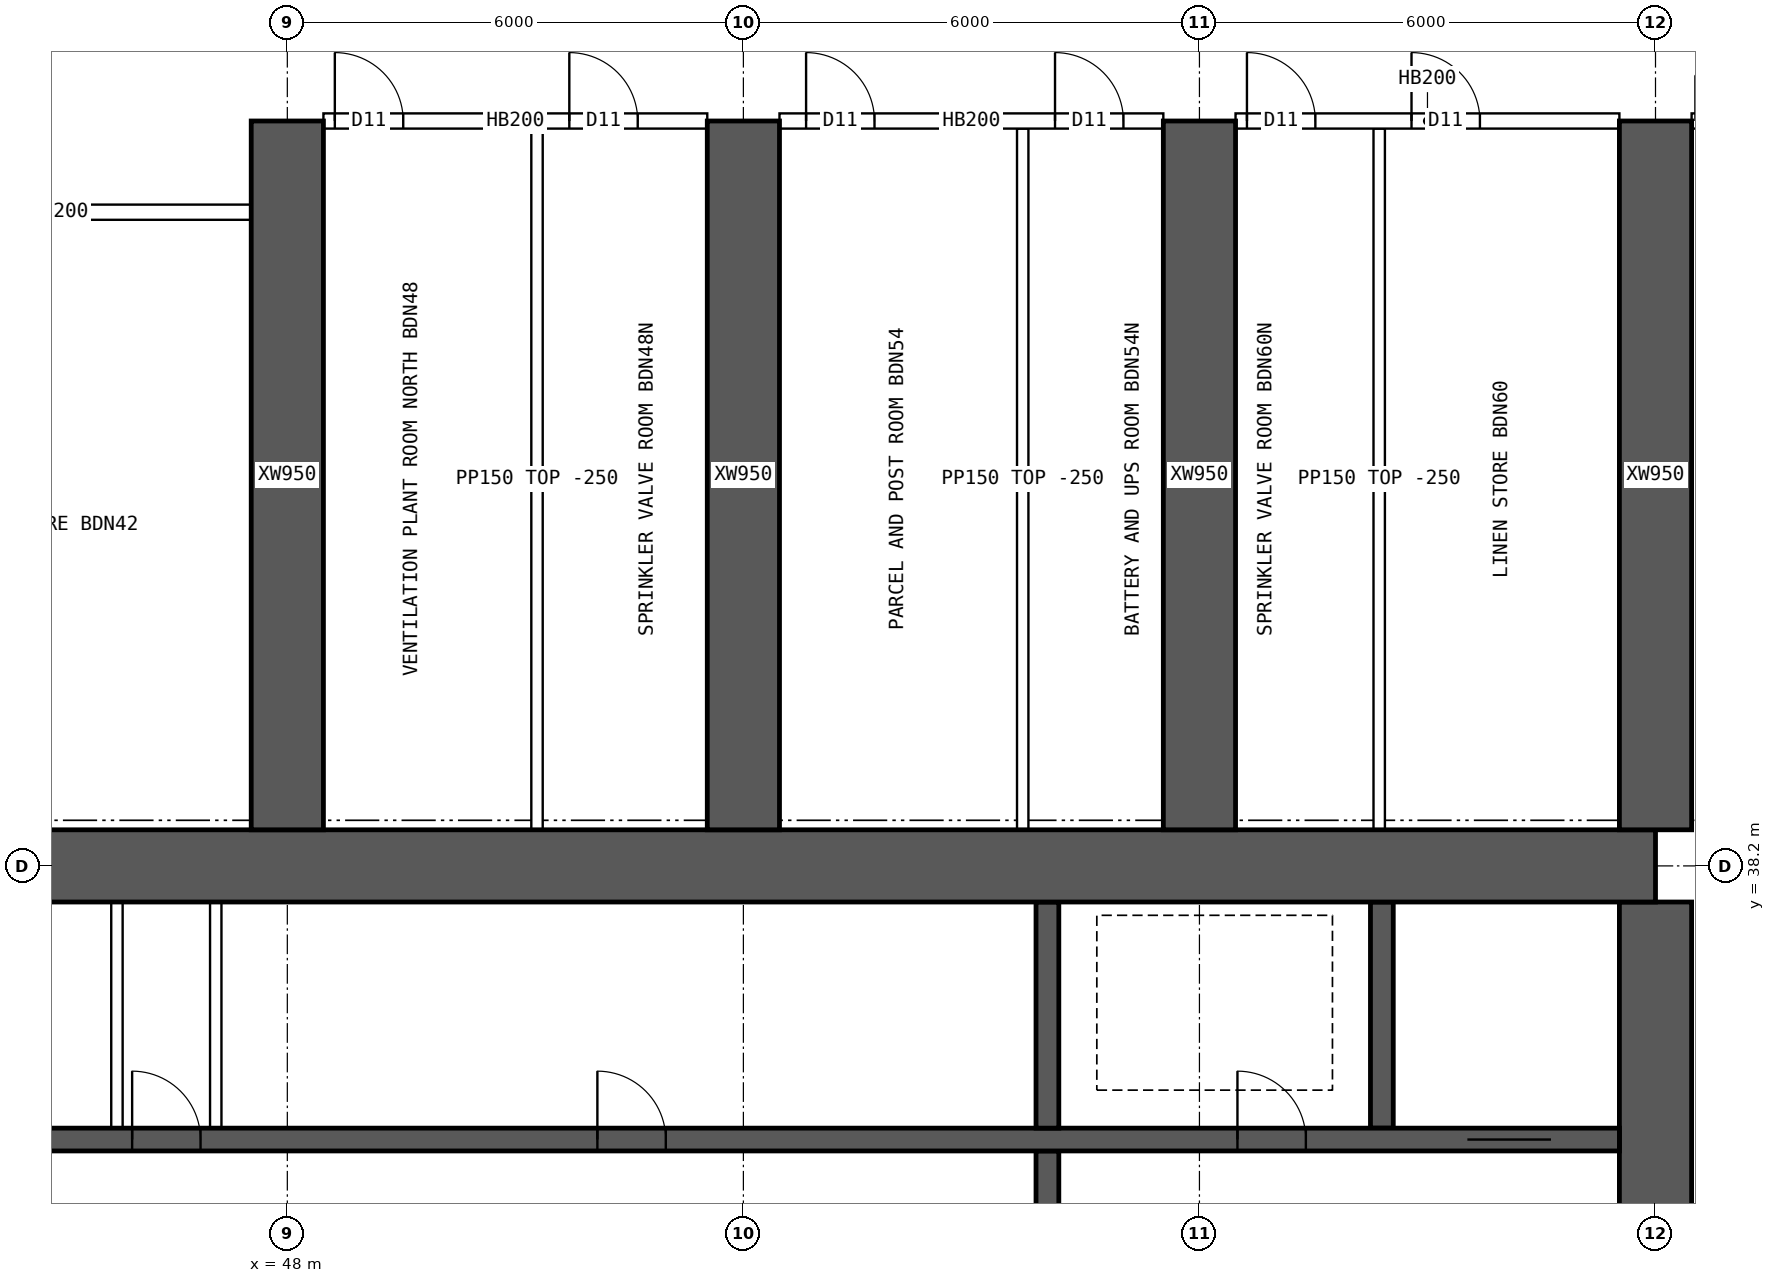
"""IFC4 building model, lengths in metres.
Left out: names, types, materials, properties, quantities, classifications, styles, units other than length and angle.
Written with IfcOpenShell. Run it as: python <this file> out.ifc"""

import sys

from ifc_helpers import new_model, si_unit, direction, frame, frame_2d, origin, place, context, subcontext, project, spatial, rectangle, extrude, element, fill, save


model = new_model("IFC4")
c1 = context("Model", 3, precision=1e-05, world=origin(), true_north=direction((0.0, 1.0)))
c2 = subcontext(c1, "Body", "Model", "MODEL_VIEW")
j1 = project(units=[si_unit("LENGTHUNIT", "METRE"), si_unit("PLANEANGLEUNIT", "RADIAN")], contexts=[c1])
p1 = place(None, origin())
s1 = spatial("IfcSite", under=j1, at=p1, CompositionType="ELEMENT")
p2 = place(p1, origin())
s2 = spatial("IfcBuilding", under=s1, at=p2, CompositionType="ELEMENT")
p3 = place(p2, frame((0.0, 0.0, 88.15)))
s3 = spatial("IfcBuildingStorey", under=s2, at=p3, CompositionType="ELEMENT", Elevation=88.15)
p4 = place(p3, frame((18.0, 38.2, 0.0), z_axis=(0.0, 0.0, 1.0), x_axis=(1.0, 0.0, 0.0)))
e1 = element("IfcWall", 1, at=p4, inside=s3, PredefinedType="SHEAR", context=c2, shape_type="SweptSolid", body=[
    extrude(rectangle(XDim=48.0, YDim=0.95, at=frame_2d((24.0, 0.0))), origin(), (0.0, 0.0, 1.0), 3.75),
])
p5 = place(p3, frame((66.0, 26.275, 0.0), z_axis=(0.0, 0.0, 1.0), x_axis=(0.0, 1.0, 0.0)))
e2 = element("IfcWall", 2, at=p5, inside=s3, PredefinedType="SHEAR", context=c2, shape_type="SweptSolid", body=[
    extrude(rectangle(XDim=11.45, YDim=0.95, at=frame_2d((5.725, 0.0))), origin(), (0.0, 0.0, 1.0), 3.75),
])
p6 = place(p5, frame((5.025, 0.0, 0.0)))
e3 = element("IfcOpeningElement", 3, at=p6, cuts=e2, PredefinedType="OPENING", context=c2, shape_type="SweptSolid", body=[
    extrude(rectangle(XDim=1.2, YDim=2.1, at=frame_2d((0.6, 1.05))), frame((0.0, 0.485, 0.0), z_axis=(0.0, -1.0, 0.0), x_axis=(1.0, 0.0, 0.0)), (0.0, 0.0, 1.0), 0.97),
])
p7 = place(p3, frame((18.475, 34.6, 0.0), z_axis=(0.0, 0.0, 1.0), x_axis=(1.0, 0.0, 0.0)))
e4 = element("IfcWall", 4, at=p7, inside=s3, PredefinedType="SHEAR", context=c2, shape_type="SweptSolid", body=[
    extrude(rectangle(XDim=47.05, YDim=0.3, at=frame_2d((23.525, 0.0))), origin(), (0.0, 0.0, 1.0), 3.75),
])
p8 = place(p7, frame((0.9, 0.0, 0.0)))
e5 = element("IfcOpeningElement", 5, at=p8, cuts=e4, PredefinedType="OPENING", context=c2, shape_type="SweptSolid", body=[
    extrude(rectangle(XDim=1.1, YDim=2.1, at=frame_2d((0.55, 1.05))), frame((0.0, 0.16, 0.0), z_axis=(0.0, -1.0, 0.0), x_axis=(1.0, 0.0, 0.0)), (0.0, 0.0, 1.0), 0.32),
])
p9 = place(p7, frame((45.05, 0.0, 0.0)))
e6 = element("IfcOpeningElement", 6, at=p9, cuts=e4, PredefinedType="OPENING", context=c2, shape_type="SweptSolid", body=[
    extrude(rectangle(XDim=1.1, YDim=2.1, at=frame_2d((0.55, 1.05))), frame((0.0, 0.16, 0.0), z_axis=(0.0, -1.0, 0.0), x_axis=(1.0, 0.0, 0.0)), (0.0, 0.0, 1.0), 0.32),
])
p10 = place(p7, frame((4.125, 0.0, 0.0)))
e7 = element("IfcOpeningElement", 7, at=p10, cuts=e4, PredefinedType="OPENING", context=c2, shape_type="SweptSolid", body=[
    extrude(rectangle(XDim=0.9, YDim=2.1, at=frame_2d((0.45, 1.05))), frame((0.0, 0.16, 0.0), z_axis=(0.0, -1.0, 0.0), x_axis=(1.0, 0.0, 0.0)), (0.0, 0.0, 1.0), 0.32),
])
p11 = place(p7, frame((42.025, 0.0, 0.0)))
e8 = element("IfcOpeningElement", 8, at=p11, cuts=e4, PredefinedType="OPENING", context=c2, shape_type="SweptSolid", body=[
    extrude(rectangle(XDim=0.9, YDim=2.1, at=frame_2d((0.45, 1.05))), frame((0.0, 0.16, 0.0), z_axis=(0.0, -1.0, 0.0), x_axis=(1.0, 0.0, 0.0)), (0.0, 0.0, 1.0), 0.32),
])
p12 = place(p7, frame((8.9, 0.0, 0.0)))
e9 = element("IfcOpeningElement", 9, at=p12, cuts=e4, PredefinedType="OPENING", context=c2, shape_type="SweptSolid", body=[
    extrude(rectangle(XDim=0.9, YDim=2.1, at=frame_2d((0.45, 1.05))), frame((0.0, 0.16, 0.0), z_axis=(0.0, -1.0, 0.0), x_axis=(1.0, 0.0, 0.0)), (0.0, 0.0, 1.0), 0.32),
])
p13 = place(p7, frame((12.874, 0.0, 0.0)))
e10 = element("IfcOpeningElement", 10, at=p13, cuts=e4, PredefinedType="OPENING", context=c2, shape_type="SweptSolid", body=[
    extrude(rectangle(XDim=0.9, YDim=2.1, at=frame_2d((0.45, 1.05))), frame((0.0, 0.16, 0.0), z_axis=(0.0, -1.0, 0.0), x_axis=(1.0, 0.0, 0.0)), (0.0, 0.0, 1.0), 0.32),
])
p14 = place(p7, frame((16.521, 0.0, 0.0)))
e11 = element("IfcOpeningElement", 11, at=p14, cuts=e4, PredefinedType="OPENING", context=c2, shape_type="SweptSolid", body=[
    extrude(rectangle(XDim=0.9, YDim=2.1, at=frame_2d((0.45, 1.05))), frame((0.0, 0.16, 0.0), z_axis=(0.0, -1.0, 0.0), x_axis=(1.0, 0.0, 0.0)), (0.0, 0.0, 1.0), 0.32),
])
p15 = place(p7, frame((20.28, 0.0, 0.0)))
e12 = element("IfcOpeningElement", 12, at=p15, cuts=e4, PredefinedType="OPENING", context=c2, shape_type="SweptSolid", body=[
    extrude(rectangle(XDim=0.9, YDim=2.1, at=frame_2d((0.45, 1.05))), frame((0.0, 0.16, 0.0), z_axis=(0.0, -1.0, 0.0), x_axis=(1.0, 0.0, 0.0)), (0.0, 0.0, 1.0), 0.32),
])
p16 = place(p7, frame((24.686, 0.0, 0.0)))
e13 = element("IfcOpeningElement", 13, at=p16, cuts=e4, PredefinedType="OPENING", context=c2, shape_type="SweptSolid", body=[
    extrude(rectangle(XDim=0.9, YDim=2.1, at=frame_2d((0.45, 1.05))), frame((0.0, 0.16, 0.0), z_axis=(0.0, -1.0, 0.0), x_axis=(1.0, 0.0, 0.0)), (0.0, 0.0, 1.0), 0.32),
])
p17 = place(p7, frame((27.483, 0.0, 0.0)))
e14 = element("IfcOpeningElement", 14, at=p17, cuts=e4, PredefinedType="OPENING", context=c2, shape_type="SweptSolid", body=[
    extrude(rectangle(XDim=0.9, YDim=2.1, at=frame_2d((0.45, 1.05))), frame((0.0, 0.16, 0.0), z_axis=(0.0, -1.0, 0.0), x_axis=(1.0, 0.0, 0.0)), (0.0, 0.0, 1.0), 0.32),
])
p18 = place(p7, frame((33.604, 0.0, 0.0)))
e15 = element("IfcOpeningElement", 15, at=p18, cuts=e4, PredefinedType="OPENING", context=c2, shape_type="SweptSolid", body=[
    extrude(rectangle(XDim=0.9, YDim=2.1, at=frame_2d((0.45, 1.05))), frame((0.0, 0.16, 0.0), z_axis=(0.0, -1.0, 0.0), x_axis=(1.0, 0.0, 0.0)), (0.0, 0.0, 1.0), 0.32),
])
p19 = place(p3, frame((58.0, 30.55, 0.0), z_axis=(0.0, 0.0, 1.0), x_axis=(0.0, 1.0, 0.0)))
e16 = element("IfcWall", 16, at=p19, inside=s3, PredefinedType="SHEAR", context=c2, shape_type="SweptSolid", body=[
    extrude(rectangle(XDim=3.9, YDim=0.3, at=frame_2d((1.95, 0.0))), origin(), (0.0, 0.0, 1.0), 3.75),
])
p20 = place(p19, frame((1.4, 0.0, 0.0)))
e17 = element("IfcOpeningElement", 17, at=p20, cuts=e16, PredefinedType="OPENING", context=c2, shape_type="SweptSolid", body=[
    extrude(rectangle(XDim=1.2, YDim=2.1, at=frame_2d((0.6, 1.05))), frame((0.0, 0.16, 0.0), z_axis=(0.0, -1.0, 0.0), x_axis=(1.0, 0.0, 0.0)), (0.0, 0.0, 1.0), 0.32),
])
for number, where, z_axis, x_axis in (
    (18, (62.4, 34.75, 0.0), (0.0, 0.0, 1.0), (0.0, 1.0, 0.0)),
    (19, (58.0, 34.75, 0.0), (0.0, 0.0, 1.0), (0.0, 1.0, 0.0)),
):
    element("IfcWall", number, at=place(p3, frame(where, z_axis=z_axis, x_axis=x_axis)), inside=s3, PredefinedType="SHEAR", context=c2, shape_type="SweptSolid", body=[
        extrude(rectangle(XDim=2.975, YDim=0.3, at=frame_2d((1.488, 0.0))), origin(), (0.0, 0.0, 1.0), 3.75),
    ])
for number, where, z_axis, x_axis in (
    (20, (48.0, 38.675, 0.0), (0.0, 0.0, 1.0), (0.0, 1.0, 0.0)),
    (21, (54.0, 38.675, 0.0), (0.0, 0.0, 1.0), (0.0, 1.0, 0.0)),
    (22, (60.0, 38.675, 0.0), (0.0, 0.0, 1.0), (0.0, 1.0, 0.0)),
    (23, (66.0, 38.675, 0.0), (0.0, 0.0, 1.0), (0.0, 1.0, 0.0)),
):
    element("IfcWall", number, at=place(p3, frame(where, z_axis=z_axis, x_axis=x_axis)), inside=s3, PredefinedType="SHEAR", context=c2, shape_type="SweptSolid", body=[
        extrude(rectangle(XDim=9.325, YDim=0.95, at=frame_2d((4.663, 0.0))), origin(), (0.0, 0.0, 1.0), 3.75),
    ])
for number, where, z_axis, x_axis in (
    (24, (45.758, 34.75, 0.0), (0.0, 0.0, 1.0), (0.0, 1.0, 0.0)),
    (25, (47.058, 34.75, 0.0), (0.0, 0.0, 1.0), (0.0, 1.0, 0.0)),
):
    element("IfcWall", number, at=place(p3, frame(where, z_axis=z_axis, x_axis=x_axis)), inside=s3, PredefinedType="SOLIDWALL", context=c2, shape_type="SweptSolid", body=[
        extrude(rectangle(XDim=2.975, YDim=0.15, at=frame_2d((1.488, 0.0))), origin(), (0.0, 0.0, 1.0), 3.5),
    ])
p21 = place(p3, frame((48.475, 48.0, 0.0), z_axis=(0.0, 0.0, 1.0), x_axis=(1.0, 0.0, 0.0)))
e26 = element("IfcWall", 26, at=p21, inside=s3, PredefinedType="SOLIDWALL", context=c2, shape_type="SweptSolid", body=[
    extrude(rectangle(XDim=5.05, YDim=0.2, at=frame_2d((2.525, 0.0))), origin(), (0.0, 0.0, 1.0), 3.5),
])
p22 = place(p21, frame((0.15, 0.0, 0.0)))
e27 = element("IfcOpeningElement", 27, at=p22, cuts=e26, PredefinedType="OPENING", context=c2, shape_type="SweptSolid", body=[
    extrude(rectangle(XDim=0.9, YDim=2.1, at=frame_2d((0.45, 1.05))), frame((0.0, 0.11, 0.0), z_axis=(0.0, -1.0, 0.0), x_axis=(1.0, 0.0, 0.0)), (0.0, 0.0, 1.0), 0.22),
])
p23 = place(p21, frame((3.235, 0.0, 0.0)))
e28 = element("IfcOpeningElement", 28, at=p23, cuts=e26, PredefinedType="OPENING", context=c2, shape_type="SweptSolid", body=[
    extrude(rectangle(XDim=0.9, YDim=2.1, at=frame_2d((0.45, 1.05))), frame((0.0, 0.11, 0.0), z_axis=(0.0, -1.0, 0.0), x_axis=(1.0, 0.0, 0.0)), (0.0, 0.0, 1.0), 0.22),
])
p24 = place(p3, frame((54.475, 48.0, 0.0), z_axis=(0.0, 0.0, 1.0), x_axis=(1.0, 0.0, 0.0)))
e29 = element("IfcWall", 29, at=p24, inside=s3, PredefinedType="SOLIDWALL", context=c2, shape_type="SweptSolid", body=[
    extrude(rectangle(XDim=5.05, YDim=0.2, at=frame_2d((2.525, 0.0))), origin(), (0.0, 0.0, 1.0), 3.5),
])
p25 = place(p24, frame((0.35, 0.0, 0.0)))
e30 = element("IfcOpeningElement", 30, at=p25, cuts=e29, PredefinedType="OPENING", context=c2, shape_type="SweptSolid", body=[
    extrude(rectangle(XDim=0.9, YDim=2.1, at=frame_2d((0.45, 1.05))), frame((0.0, 0.11, 0.0), z_axis=(0.0, -1.0, 0.0), x_axis=(1.0, 0.0, 0.0)), (0.0, 0.0, 1.0), 0.22),
])
p26 = place(p24, frame((3.625, 0.0, 0.0)))
e31 = element("IfcOpeningElement", 31, at=p26, cuts=e29, PredefinedType="OPENING", context=c2, shape_type="SweptSolid", body=[
    extrude(rectangle(XDim=0.9, YDim=2.1, at=frame_2d((0.45, 1.05))), frame((0.0, 0.11, 0.0), z_axis=(0.0, -1.0, 0.0), x_axis=(1.0, 0.0, 0.0)), (0.0, 0.0, 1.0), 0.22),
])
p27 = place(p3, frame((60.475, 48.0, 0.0), z_axis=(0.0, 0.0, 1.0), x_axis=(1.0, 0.0, 0.0)))
e32 = element("IfcWall", 32, at=p27, inside=s3, PredefinedType="SOLIDWALL", context=c2, shape_type="SweptSolid", body=[
    extrude(rectangle(XDim=5.05, YDim=0.2, at=frame_2d((2.525, 0.0))), origin(), (0.0, 0.0, 1.0), 3.5),
])
p28 = place(p27, frame((0.15, 0.0, 0.0)))
e33 = element("IfcOpeningElement", 33, at=p28, cuts=e32, PredefinedType="OPENING", context=c2, shape_type="SweptSolid", body=[
    extrude(rectangle(XDim=0.9, YDim=2.1, at=frame_2d((0.45, 1.05))), frame((0.0, 0.11, 0.0), z_axis=(0.0, -1.0, 0.0), x_axis=(1.0, 0.0, 0.0)), (0.0, 0.0, 1.0), 0.22),
])
p29 = place(p27, frame((2.315, 0.0, 0.0)))
e34 = element("IfcOpeningElement", 34, at=p29, cuts=e32, PredefinedType="OPENING", context=c2, shape_type="SweptSolid", body=[
    extrude(rectangle(XDim=0.9, YDim=2.1, at=frame_2d((0.45, 1.05))), frame((0.0, 0.11, 0.0), z_axis=(0.0, -1.0, 0.0), x_axis=(1.0, 0.0, 0.0)), (0.0, 0.0, 1.0), 0.22),
])
p30 = place(p3, frame((66.475, 48.0, 0.0), z_axis=(0.0, 0.0, 1.0), x_axis=(1.0, 0.0, 0.0)))
e35 = element("IfcWall", 35, at=p30, inside=s3, PredefinedType="SOLIDWALL", context=c2, shape_type="SweptSolid", body=[
    extrude(rectangle(XDim=1.925, YDim=0.2, at=frame_2d((0.962, 0.0))), origin(), (0.0, 0.0, 1.0), 3.5),
])
p31 = place(p30, frame((0.05, 0.0, 0.0)))
e36 = element("IfcOpeningElement", 36, at=p31, cuts=e35, PredefinedType="OPENING", context=c2, shape_type="SweptSolid", body=[
    extrude(rectangle(XDim=1.2, YDim=2.1, at=frame_2d((0.6, 1.05))), frame((0.0, 0.11, 0.0), z_axis=(0.0, -1.0, 0.0), x_axis=(1.0, 0.0, 0.0)), (0.0, 0.0, 1.0), 0.22),
])
p32 = place(p3, frame((42.475, 46.8, 0.0), z_axis=(0.0, 0.0, 1.0), x_axis=(1.0, 0.0, 0.0)))
e37 = element("IfcWall", 37, at=p32, inside=s3, PredefinedType="SOLIDWALL", context=c2, shape_type="SweptSolid", body=[
    extrude(rectangle(XDim=5.05, YDim=0.2, at=frame_2d((2.525, 0.0))), origin(), (0.0, 0.0, 1.0), 3.5),
])
p33 = place(p32, frame((0.8, 0.0, 0.0)))
e38 = element("IfcOpeningElement", 38, at=p33, cuts=e37, PredefinedType="OPENING", context=c2, shape_type="SweptSolid", body=[
    extrude(rectangle(XDim=1.0, YDim=2.1, at=frame_2d((0.5, 1.05))), frame((0.0, 0.11, 0.0), z_axis=(0.0, -1.0, 0.0), x_axis=(1.0, 0.0, 0.0)), (0.0, 0.0, 1.0), 0.22),
])
for number, where, z_axis, x_axis in (
    (39, (51.285, 38.675, 0.0), (0.0, 0.0, 1.0), (0.0, 1.0, 0.0)),
    (40, (57.675, 38.675, 0.0), (0.0, 0.0, 1.0), (0.0, 1.0, 0.0)),
    (41, (62.365, 38.675, 0.0), (0.0, 0.0, 1.0), (0.0, 1.0, 0.0)),
):
    element("IfcWall", number, at=place(p3, frame(where, z_axis=z_axis, x_axis=x_axis)), inside=s3, PredefinedType="PARTITIONING", context=c2, shape_type="SweptSolid", body=[
        extrude(rectangle(XDim=9.225, YDim=0.15, at=frame_2d((4.612, 0.0))), origin(), (0.0, 0.0, 1.0), 3.5),
    ])
p34 = place(p9, origin())
e42 = element("IfcDoor", 42, at=p34, inside=s3, OperationType="DOUBLE_DOOR_SLIDING", PredefinedType="DOOR", context=c2, shape_type="SweptSolid", body=[
    extrude(rectangle(XDim=1.1, YDim=2.1, at=frame_2d((0.55, 1.05))), frame((0.0, 0.025, 0.0), z_axis=(0.0, -1.0, 0.0), x_axis=(1.0, 0.0, 0.0)), (0.0, 0.0, 1.0), 0.05),
])
fill(e6, e42)
p35 = place(p11, origin())
e43 = element("IfcDoor", 43, at=p35, inside=s3, OperationType="SINGLE_SWING_LEFT", PredefinedType="DOOR", context=c2, shape_type="SweptSolid", body=[
    extrude(rectangle(XDim=0.9, YDim=2.1, at=frame_2d((0.45, 1.05))), frame((0.0, 0.025, 0.0), z_axis=(0.0, -1.0, 0.0), x_axis=(1.0, 0.0, 0.0)), (0.0, 0.0, 1.0), 0.05),
])
fill(e8, e43)
p36 = place(p17, origin())
e44 = element("IfcDoor", 44, at=p36, inside=s3, OperationType="SINGLE_SWING_LEFT", PredefinedType="DOOR", context=c2, shape_type="SweptSolid", body=[
    extrude(rectangle(XDim=0.9, YDim=2.1, at=frame_2d((0.45, 1.05))), frame((0.0, 0.025, 0.0), z_axis=(0.0, -1.0, 0.0), x_axis=(1.0, 0.0, 0.0)), (0.0, 0.0, 1.0), 0.05),
])
fill(e14, e44)
p37 = place(p18, origin())
e45 = element("IfcDoor", 45, at=p37, inside=s3, OperationType="SINGLE_SWING_LEFT", PredefinedType="DOOR", context=c2, shape_type="SweptSolid", body=[
    extrude(rectangle(XDim=0.9, YDim=2.1, at=frame_2d((0.45, 1.05))), frame((0.0, 0.025, 0.0), z_axis=(0.0, -1.0, 0.0), x_axis=(1.0, 0.0, 0.0)), (0.0, 0.0, 1.0), 0.05),
])
fill(e15, e45)
p38 = place(p22, origin())
e46 = element("IfcDoor", 46, at=p38, inside=s3, OperationType="SINGLE_SWING_LEFT", PredefinedType="DOOR", context=c2, shape_type="SweptSolid", body=[
    extrude(rectangle(XDim=0.9, YDim=2.1, at=frame_2d((0.45, 1.05))), frame((0.0, 0.025, 0.0), z_axis=(0.0, -1.0, 0.0), x_axis=(1.0, 0.0, 0.0)), (0.0, 0.0, 1.0), 0.05),
])
fill(e27, e46)
p39 = place(p23, origin())
e47 = element("IfcDoor", 47, at=p39, inside=s3, OperationType="SINGLE_SWING_LEFT", PredefinedType="DOOR", context=c2, shape_type="SweptSolid", body=[
    extrude(rectangle(XDim=0.9, YDim=2.1, at=frame_2d((0.45, 1.05))), frame((0.0, 0.025, 0.0), z_axis=(0.0, -1.0, 0.0), x_axis=(1.0, 0.0, 0.0)), (0.0, 0.0, 1.0), 0.05),
])
fill(e28, e47)
p40 = place(p25, origin())
e48 = element("IfcDoor", 48, at=p40, inside=s3, OperationType="SINGLE_SWING_LEFT", PredefinedType="DOOR", context=c2, shape_type="SweptSolid", body=[
    extrude(rectangle(XDim=0.9, YDim=2.1, at=frame_2d((0.45, 1.05))), frame((0.0, 0.025, 0.0), z_axis=(0.0, -1.0, 0.0), x_axis=(1.0, 0.0, 0.0)), (0.0, 0.0, 1.0), 0.05),
])
fill(e30, e48)
p41 = place(p26, origin())
e49 = element("IfcDoor", 49, at=p41, inside=s3, OperationType="SINGLE_SWING_LEFT", PredefinedType="DOOR", context=c2, shape_type="SweptSolid", body=[
    extrude(rectangle(XDim=0.9, YDim=2.1, at=frame_2d((0.45, 1.05))), frame((0.0, 0.025, 0.0), z_axis=(0.0, -1.0, 0.0), x_axis=(1.0, 0.0, 0.0)), (0.0, 0.0, 1.0), 0.05),
])
fill(e31, e49)
p42 = place(p28, origin())
e50 = element("IfcDoor", 50, at=p42, inside=s3, OperationType="SINGLE_SWING_LEFT", PredefinedType="DOOR", context=c2, shape_type="SweptSolid", body=[
    extrude(rectangle(XDim=0.9, YDim=2.1, at=frame_2d((0.45, 1.05))), frame((0.0, 0.025, 0.0), z_axis=(0.0, -1.0, 0.0), x_axis=(1.0, 0.0, 0.0)), (0.0, 0.0, 1.0), 0.05),
])
fill(e33, e50)
p43 = place(p29, origin())
e51 = element("IfcDoor", 51, at=p43, inside=s3, OperationType="SINGLE_SWING_LEFT", PredefinedType="DOOR", context=c2, shape_type="SweptSolid", body=[
    extrude(rectangle(XDim=0.9, YDim=2.1, at=frame_2d((0.45, 1.05))), frame((0.0, 0.025, 0.0), z_axis=(0.0, -1.0, 0.0), x_axis=(1.0, 0.0, 0.0)), (0.0, 0.0, 1.0), 0.05),
])
fill(e34, e51)
save(model, sys.argv[1])
